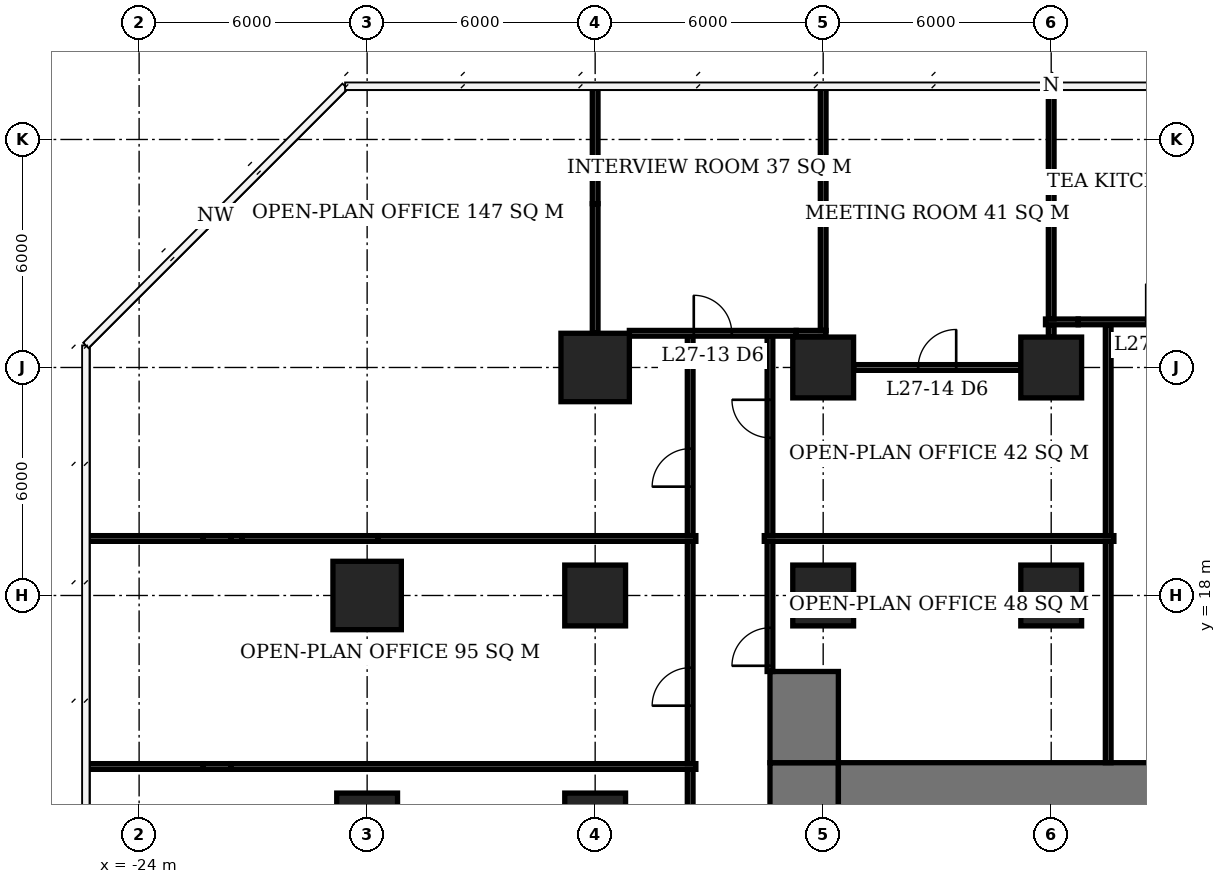
"""IFC4 building model, lengths in metres.
Left out: names, types, materials, properties, quantities, classifications, styles, units other than length and angle.
Written with IfcOpenShell. Run it as: python <this file> out.ifc"""

import sys

from ifc_helpers import new_model, si_unit, direction, frame, frame_2d, origin, origin_2d, place, context, subcontext, project, spatial, rectangle, extrude, element, fill, save


model = new_model("IFC4")
c1 = context("Model", 3, precision=1e-05, world=origin(), true_north=direction((0.0, 1.0)))
c2 = subcontext(c1, "Body", "Model", "MODEL_VIEW")
j1 = project(units=[si_unit("LENGTHUNIT", "METRE"), si_unit("PLANEANGLEUNIT", "RADIAN")], contexts=[c1])
p1 = place(None, origin())
s1 = spatial("IfcSite", under=j1, at=p1, CompositionType="ELEMENT")
p2 = place(p1, origin())
s2 = spatial("IfcBuilding", under=s1, at=p2, CompositionType="ELEMENT")
p3 = place(p2, frame((0.0, 0.0, 113.3)))
s3 = spatial("IfcBuildingStorey", under=s2, at=p3, CompositionType="ELEMENT", Elevation=113.3)
p4 = place(p3, frame((-18.0, 12.0, 0.0), z_axis=(0.0, 0.0, 1.0), x_axis=(1.0, 0.0, 0.0)))
e1 = element("IfcColumn", 1, at=p4, inside=s3, PredefinedType="COLUMN", context=c2, shape_type="SweptSolid", body=[
    extrude(rectangle(XDim=1.6, YDim=1.6, at=origin_2d()), origin(), (0.0, 0.0, 1.0), 3.9),
])
p5 = place(p3, frame((-18.0, 18.0, 0.0), z_axis=(0.0, 0.0, 1.0), x_axis=(1.0, 0.0, 0.0)))
e2 = element("IfcColumn", 2, at=p5, inside=s3, PredefinedType="COLUMN", context=c2, shape_type="SweptSolid", body=[
    extrude(rectangle(XDim=1.8, YDim=1.8, at=origin_2d()), origin(), (0.0, 0.0, 1.0), 3.9),
])
for number, where, z_axis, x_axis in (
    (3, (-12.0, 12.0, 0.0), (0.0, 0.0, 1.0), (1.0, 0.0, 0.0)),
    (4, (-12.0, 18.0, 0.0), (0.0, 0.0, 1.0), (1.0, 0.0, 0.0)),
):
    element("IfcColumn", number, at=place(p3, frame(where, z_axis=z_axis, x_axis=x_axis)), inside=s3, PredefinedType="COLUMN", context=c2, shape_type="SweptSolid", body=[
        extrude(rectangle(XDim=1.6, YDim=1.6, at=origin_2d()), origin(), (0.0, 0.0, 1.0), 3.9),
    ])
p6 = place(p3, frame((-12.0, 24.0, 0.0), z_axis=(0.0, 0.0, 1.0), x_axis=(1.0, 0.0, 0.0)))
e5 = element("IfcColumn", 5, at=p6, inside=s3, PredefinedType="COLUMN", context=c2, shape_type="SweptSolid", body=[
    extrude(rectangle(XDim=1.8, YDim=1.8, at=origin_2d()), origin(), (0.0, 0.0, 1.0), 3.9),
])
for number, where, z_axis, x_axis in (
    (6, (-6.0, 18.0, 0.0), (0.0, 0.0, 1.0), (1.0, 0.0, 0.0)),
    (7, (-6.0, 24.0, 0.0), (0.0, 0.0, 1.0), (1.0, 0.0, 0.0)),
    (8, (0.0, 18.0, 0.0), (0.0, 0.0, 1.0), (1.0, 0.0, 0.0)),
    (9, (0.0, 24.0, 0.0), (0.0, 0.0, 1.0), (1.0, 0.0, 0.0)),
):
    element("IfcColumn", number, at=place(p3, frame(where, z_axis=z_axis, x_axis=x_axis)), inside=s3, PredefinedType="COLUMN", context=c2, shape_type="SweptSolid", body=[
        extrude(rectangle(XDim=1.6, YDim=1.6, at=origin_2d()), origin(), (0.0, 0.0, 1.0), 3.9),
    ])
p7 = place(p3, frame((-5.6, 12.6, 0.0), z_axis=(0.0, 0.0, 1.0), x_axis=(1.0, 0.0, 0.0)))
e10 = element("IfcWall", 10, at=p7, inside=s3, PredefinedType="SHEAR", context=c2, shape_type="SweptSolid", body=[
    extrude(rectangle(XDim=23.2, YDim=2.0, at=frame_2d((11.6, 0.0))), origin(), (0.0, 0.0, 1.0), 3.9),
])
p8 = place(p3, frame((-6.5, -7.6, 0.0), z_axis=(0.0, 0.0, 1.0), x_axis=(0.0, 1.0, 0.0)))
e11 = element("IfcWall", 11, at=p8, inside=s3, PredefinedType="SHEAR", context=c2, shape_type="SweptSolid", body=[
    extrude(rectangle(XDim=21.2, YDim=1.8, at=frame_2d((10.6, 0.0))), origin(), (0.0, 0.0, 1.0), 3.9),
])
p9 = place(p8, frame((7.8, 0.0, 0.0)))
e12 = element("IfcOpeningElement", 12, at=p9, cuts=e11, PredefinedType="OPENING", context=c2, shape_type="SweptSolid", body=[
    extrude(rectangle(XDim=1.8, YDim=2.4, at=frame_2d((0.9, 1.2))), frame((0.0, 0.91, 0.0), z_axis=(0.0, -1.0, 0.0), x_axis=(1.0, 0.0, 0.0)), (0.0, 0.0, 1.0), 1.82),
])
p10 = place(p3, frame((-6.5, 13.6, 0.0), z_axis=(0.0, 0.0, 1.0), x_axis=(0.0, 1.0, 0.0)))
e13 = element("IfcWall", 13, at=p10, inside=s3, PredefinedType="SHEAR", context=c2, shape_type="SweptSolid", body=[
    extrude(rectangle(XDim=2.4, YDim=1.8, at=frame_2d((1.2, 0.0))), origin(), (0.0, 0.0, 1.0), 3.9),
])
p11 = place(p3, frame((-5.2, 24.0, 0.0), z_axis=(0.0, 0.0, 1.0), x_axis=(1.0, 0.0, 0.0)))
e14 = element("IfcWall", 14, at=p11, inside=s3, PredefinedType="PARTITIONING", context=c2, shape_type="SweptSolid", body=[
    extrude(rectangle(XDim=4.4, YDim=0.15, at=frame_2d((2.2, 0.0))), origin(), (0.0, 0.0, 1.0), 3.65),
])
p12 = place(p11, frame((1.7, 0.0, 0.0)))
e15 = element("IfcOpeningElement", 15, at=p12, cuts=e14, PredefinedType="OPENING", context=c2, shape_type="SweptSolid", body=[
    extrude(rectangle(XDim=1.0, YDim=2.1, at=frame_2d((0.5, 1.05))), frame((0.0, 0.085, 0.0), z_axis=(0.0, -1.0, 0.0), x_axis=(1.0, 0.0, 0.0)), (0.0, 0.0, 1.0), 0.17),
])
p13 = place(p3, frame((-11.1, 24.9, 0.0), z_axis=(0.0, 0.0, 1.0), x_axis=(1.0, 0.0, 0.0)))
e16 = element("IfcWall", 16, at=p13, inside=s3, PredefinedType="PARTITIONING", context=c2, shape_type="SweptSolid", body=[
    extrude(rectangle(XDim=4.39, YDim=0.15, at=frame_2d((2.195, 0.0))), origin(), (0.0, 0.0, 1.0), 3.65),
])
p14 = place(p13, frame((1.695, 0.0, 0.0)))
e17 = element("IfcOpeningElement", 17, at=p14, cuts=e16, PredefinedType="OPENING", context=c2, shape_type="SweptSolid", body=[
    extrude(rectangle(XDim=1.0, YDim=2.1, at=frame_2d((0.5, 1.05))), frame((0.0, 0.085, 0.0), z_axis=(0.0, -1.0, 0.0), x_axis=(1.0, 0.0, 0.0)), (0.0, 0.0, 1.0), 0.17),
])
p15 = place(p3, frame((-6.71, 24.9, 0.0), z_axis=(0.0, 0.0, 1.0), x_axis=(1.0, 0.0, 0.0)))
e18 = element("IfcWall", 18, at=p15, inside=s3, PredefinedType="PARTITIONING", context=c2, shape_type="SweptSolid", body=[
    extrude(rectangle(XDim=0.785, YDim=0.15, at=frame_2d((0.393, 0.0))), origin(), (0.0, 0.0, 1.0), 2.65),
])
p16 = place(p3, frame((-0.15, 25.2, 0.0), z_axis=(0.0, 0.0, 1.0), x_axis=(1.0, 0.0, 0.0)))
e19 = element("IfcWall", 19, at=p16, inside=s3, PredefinedType="PARTITIONING", context=c2, shape_type="SweptSolid", body=[
    extrude(rectangle(XDim=0.86, YDim=0.15, at=frame_2d((0.43, 0.0))), origin(), (0.0, 0.0, 1.0), 2.65),
])
p17 = place(p3, frame((0.71, 25.2, 0.0), z_axis=(0.0, 0.0, 1.0), x_axis=(1.0, 0.0, 0.0)))
e20 = element("IfcWall", 20, at=p17, inside=s3, PredefinedType="PARTITIONING", context=c2, shape_type="SweptSolid", body=[
    extrude(rectangle(XDim=4.58, YDim=0.15, at=frame_2d((2.29, 0.0))), origin(), (0.0, 0.0, 1.0), 3.65),
])
p18 = place(p17, frame((1.79, 0.0, 0.0)))
e21 = element("IfcOpeningElement", 21, at=p18, cuts=e20, PredefinedType="OPENING", context=c2, shape_type="SweptSolid", body=[
    extrude(rectangle(XDim=1.0, YDim=2.1, at=frame_2d((0.5, 1.05))), frame((0.0, 0.085, 0.0), z_axis=(0.0, -1.0, 0.0), x_axis=(1.0, 0.0, 0.0)), (0.0, 0.0, 1.0), 0.17),
])
p19 = place(p3, frame((-12.0, 24.9, 0.0), z_axis=(0.0, 0.0, 1.0), x_axis=(0.0, 1.0, 0.0)))
e22 = element("IfcWall", 22, at=p19, inside=s3, PredefinedType="PARTITIONING", context=c2, shape_type="SweptSolid", body=[
    extrude(rectangle(XDim=3.41, YDim=0.15, at=frame_2d((1.705, 0.0))), origin(), (0.0, 0.0, 1.0), 2.65),
])
p20 = place(p3, frame((-12.0, 28.31, 0.0), z_axis=(0.0, 0.0, 1.0), x_axis=(0.0, 1.0, 0.0)))
e23 = element("IfcWall", 23, at=p20, inside=s3, PredefinedType="PARTITIONING", context=c2, shape_type="SweptSolid", body=[
    extrude(rectangle(XDim=3.09, YDim=0.15, at=frame_2d((1.545, 0.0))), origin(), (0.0, 0.0, 1.0), 3.65),
])
p21 = place(p3, frame((-6.0, 24.975, 0.0), z_axis=(0.0, 0.0, 1.0), x_axis=(0.0, 1.0, 0.0)))
e24 = element("IfcWall", 24, at=p21, inside=s3, PredefinedType="PARTITIONING", context=c2, shape_type="SweptSolid", body=[
    extrude(rectangle(XDim=3.335, YDim=0.15, at=frame_2d((1.667, 0.0))), origin(), (0.0, 0.0, 1.0), 2.65),
])
p22 = place(p3, frame((-6.0, 28.31, 0.0), z_axis=(0.0, 0.0, 1.0), x_axis=(0.0, 1.0, 0.0)))
e25 = element("IfcWall", 25, at=p22, inside=s3, PredefinedType="PARTITIONING", context=c2, shape_type="SweptSolid", body=[
    extrude(rectangle(XDim=3.09, YDim=0.15, at=frame_2d((1.545, 0.0))), origin(), (0.0, 0.0, 1.0), 3.65),
])
p23 = place(p3, frame((0.0, 24.8, 0.0), z_axis=(0.0, 0.0, 1.0), x_axis=(0.0, 1.0, 0.0)))
e26 = element("IfcWall", 26, at=p23, inside=s3, PredefinedType="PARTITIONING", context=c2, shape_type="SweptSolid", body=[
    extrude(rectangle(XDim=0.325, YDim=0.15, at=frame_2d((0.163, 0.0))), origin(), (0.0, 0.0, 1.0), 2.65),
])
p24 = place(p3, frame((0.0, 25.275, 0.0), z_axis=(0.0, 0.0, 1.0), x_axis=(0.0, 1.0, 0.0)))
e27 = element("IfcWall", 27, at=p24, inside=s3, PredefinedType="PARTITIONING", context=c2, shape_type="SweptSolid", body=[
    extrude(rectangle(XDim=3.035, YDim=0.15, at=frame_2d((1.518, 0.0))), origin(), (0.0, 0.0, 1.0), 2.65),
])
p25 = place(p3, frame((0.0, 28.31, 0.0), z_axis=(0.0, 0.0, 1.0), x_axis=(0.0, 1.0, 0.0)))
e28 = element("IfcWall", 28, at=p25, inside=s3, PredefinedType="PARTITIONING", context=c2, shape_type="SweptSolid", body=[
    extrude(rectangle(XDim=3.04, YDim=0.15, at=frame_2d((1.52, 0.0))), origin(), (0.0, 0.0, 1.0), 3.65),
])
p26 = place(p3, frame((-25.4, 13.5, 0.0), z_axis=(0.0, 0.0, 1.0), x_axis=(1.0, 0.0, 0.0)))
e29 = element("IfcWall", 29, at=p26, inside=s3, PredefinedType="PARTITIONING", context=c2, shape_type="SweptSolid", body=[
    extrude(rectangle(XDim=3.09, YDim=0.15, at=frame_2d((1.545, 0.0))), origin(), (0.0, 0.0, 1.0), 3.65),
])
p27 = place(p3, frame((-22.31, 13.5, 0.0), z_axis=(0.0, 0.0, 1.0), x_axis=(1.0, 0.0, 0.0)))
e30 = element("IfcWall", 30, at=p27, inside=s3, PredefinedType="PARTITIONING", context=c2, shape_type="SweptSolid", body=[
    extrude(rectangle(XDim=0.72, YDim=0.15, at=frame_2d((0.36, 0.0))), origin(), (0.0, 0.0, 1.0), 2.65),
])
p28 = place(p3, frame((-21.59, 13.5, 0.0), z_axis=(0.0, 0.0, 1.0), x_axis=(1.0, 0.0, 0.0)))
e31 = element("IfcWall", 31, at=p28, inside=s3, PredefinedType="PARTITIONING", context=c2, shape_type="SweptSolid", body=[
    extrude(rectangle(XDim=12.24, YDim=0.15, at=frame_2d((6.12, 0.0))), origin(), (0.0, 0.0, 1.0), 3.65),
])
p29 = place(p3, frame((-25.4, 19.5, 0.0), z_axis=(0.0, 0.0, 1.0), x_axis=(1.0, 0.0, 0.0)))
e32 = element("IfcWall", 32, at=p29, inside=s3, PredefinedType="PARTITIONING", context=c2, shape_type="SweptSolid", body=[
    extrude(rectangle(XDim=3.09, YDim=0.15, at=frame_2d((1.545, 0.0))), origin(), (0.0, 0.0, 1.0), 3.65),
])
p30 = place(p3, frame((-22.31, 19.5, 0.0), z_axis=(0.0, 0.0, 1.0), x_axis=(1.0, 0.0, 0.0)))
e33 = element("IfcWall", 33, at=p30, inside=s3, PredefinedType="PARTITIONING", context=c2, shape_type="SweptSolid", body=[
    extrude(rectangle(XDim=0.72, YDim=0.15, at=frame_2d((0.36, 0.0))), origin(), (0.0, 0.0, 1.0), 2.65),
])
p31 = place(p3, frame((-21.59, 19.5, 0.0), z_axis=(0.0, 0.0, 1.0), x_axis=(1.0, 0.0, 0.0)))
e34 = element("IfcWall", 34, at=p31, inside=s3, PredefinedType="PARTITIONING", context=c2, shape_type="SweptSolid", body=[
    extrude(rectangle(XDim=0.298, YDim=0.15, at=frame_2d((0.149, 0.0))), origin(), (0.0, 0.0, 1.0), 3.65),
])
p32 = place(p3, frame((-21.292, 19.5, 0.0), z_axis=(0.0, 0.0, 1.0), x_axis=(1.0, 0.0, 0.0)))
e35 = element("IfcWall", 35, at=p32, inside=s3, PredefinedType="PARTITIONING", context=c2, shape_type="SweptSolid", body=[
    extrude(rectangle(XDim=3.584, YDim=0.15, at=frame_2d((1.792, 0.0))), origin(), (0.0, 0.0, 1.0), 2.65),
])
p33 = place(p3, frame((-17.708, 19.5, 0.0), z_axis=(0.0, 0.0, 1.0), x_axis=(1.0, 0.0, 0.0)))
e36 = element("IfcWall", 36, at=p33, inside=s3, PredefinedType="PARTITIONING", context=c2, shape_type="SweptSolid", body=[
    extrude(rectangle(XDim=8.358, YDim=0.15, at=frame_2d((4.179, 0.0))), origin(), (0.0, 0.0, 1.0), 3.65),
])
p34 = place(p3, frame((-9.5, 7.575, 0.0), z_axis=(0.0, 0.0, 1.0), x_axis=(0.0, 1.0, 0.0)))
e37 = element("IfcWall", 37, at=p34, inside=s3, PredefinedType="PARTITIONING", context=c2, shape_type="SweptSolid", body=[
    extrude(rectangle(XDim=5.85, YDim=0.15, at=frame_2d((2.925, 0.0))), origin(), (0.0, 0.0, 1.0), 3.65),
])
p35 = place(p34, frame((1.525, 0.0, 0.0)))
e38 = element("IfcOpeningElement", 38, at=p35, cuts=e37, PredefinedType="OPENING", context=c2, shape_type="SweptSolid", body=[
    extrude(rectangle(XDim=1.0, YDim=2.1, at=frame_2d((0.5, 1.05))), frame((0.0, 0.085, 0.0), z_axis=(0.0, -1.0, 0.0), x_axis=(1.0, 0.0, 0.0)), (0.0, 0.0, 1.0), 0.17),
])
p36 = place(p3, frame((-9.5, 13.575, 0.0), z_axis=(0.0, 0.0, 1.0), x_axis=(0.0, 1.0, 0.0)))
e39 = element("IfcWall", 39, at=p36, inside=s3, PredefinedType="PARTITIONING", context=c2, shape_type="SweptSolid", body=[
    extrude(rectangle(XDim=5.85, YDim=0.15, at=frame_2d((2.925, 0.0))), origin(), (0.0, 0.0, 1.0), 3.65),
])
p37 = place(p36, frame((1.525, 0.0, 0.0)))
e40 = element("IfcOpeningElement", 40, at=p37, cuts=e39, PredefinedType="OPENING", context=c2, shape_type="SweptSolid", body=[
    extrude(rectangle(XDim=1.0, YDim=2.1, at=frame_2d((0.5, 1.05))), frame((0.0, 0.085, 0.0), z_axis=(0.0, -1.0, 0.0), x_axis=(1.0, 0.0, 0.0)), (0.0, 0.0, 1.0), 0.17),
])
p38 = place(p3, frame((-9.5, 19.575, 0.0), z_axis=(0.0, 0.0, 1.0), x_axis=(0.0, 1.0, 0.0)))
e41 = element("IfcWall", 41, at=p38, inside=s3, PredefinedType="PARTITIONING", context=c2, shape_type="SweptSolid", body=[
    extrude(rectangle(XDim=5.25, YDim=0.15, at=frame_2d((2.625, 0.0))), origin(), (0.0, 0.0, 1.0), 3.65),
])
p39 = place(p38, frame((1.289, 0.0, 0.0)))
e42 = element("IfcOpeningElement", 42, at=p39, cuts=e41, PredefinedType="OPENING", context=c2, shape_type="SweptSolid", body=[
    extrude(rectangle(XDim=1.0, YDim=2.1, at=frame_2d((0.5, 1.05))), frame((0.0, 0.085, 0.0), z_axis=(0.0, -1.0, 0.0), x_axis=(1.0, 0.0, 0.0)), (0.0, 0.0, 1.0), 0.17),
])
p40 = place(p3, frame((-7.4, 16.0, 0.0), z_axis=(0.0, 0.0, 1.0), x_axis=(0.0, 1.0, 0.0)))
e43 = element("IfcWall", 43, at=p40, inside=s3, PredefinedType="PARTITIONING", context=c2, shape_type="SweptSolid", body=[
    extrude(rectangle(XDim=3.425, YDim=0.15, at=frame_2d((1.712, 0.0))), origin(), (0.0, 0.0, 1.0), 3.65),
])
p41 = place(p40, frame((0.15, 0.0, 0.0)))
e44 = element("IfcOpeningElement", 44, at=p41, cuts=e43, PredefinedType="OPENING", context=c2, shape_type="SweptSolid", body=[
    extrude(rectangle(XDim=1.0, YDim=2.1, at=frame_2d((0.5, 1.05))), frame((0.0, 0.085, 0.0), z_axis=(0.0, -1.0, 0.0), x_axis=(1.0, 0.0, 0.0)), (0.0, 0.0, 1.0), 0.17),
])
p42 = place(p3, frame((-7.4, 19.575, 0.0), z_axis=(0.0, 0.0, 1.0), x_axis=(0.0, 1.0, 0.0)))
e45 = element("IfcWall", 45, at=p42, inside=s3, PredefinedType="PARTITIONING", context=c2, shape_type="SweptSolid", body=[
    extrude(rectangle(XDim=5.25, YDim=0.15, at=frame_2d((2.625, 0.0))), origin(), (0.0, 0.0, 1.0), 3.65),
])
p43 = place(p42, frame((2.575, 0.0, 0.0)))
e46 = element("IfcOpeningElement", 46, at=p43, cuts=e45, PredefinedType="OPENING", context=c2, shape_type="SweptSolid", body=[
    extrude(rectangle(XDim=1.0, YDim=2.1, at=frame_2d((0.5, 1.05))), frame((0.0, 0.085, 0.0), z_axis=(0.0, -1.0, 0.0), x_axis=(1.0, 0.0, 0.0)), (0.0, 0.0, 1.0), 0.17),
])
p44 = place(p3, frame((-7.55, 19.5, 0.0), z_axis=(0.0, 0.0, 1.0), x_axis=(1.0, 0.0, 0.0)))
e47 = element("IfcWall", 47, at=p44, inside=s3, PredefinedType="PARTITIONING", context=c2, shape_type="SweptSolid", body=[
    extrude(rectangle(XDim=9.2, YDim=0.15, at=frame_2d((4.6, 0.0))), origin(), (0.0, 0.0, 1.0), 3.65),
])
p45 = place(p3, frame((1.5, 13.6, 0.0), z_axis=(0.0, 0.0, 1.0), x_axis=(0.0, 1.0, 0.0)))
e48 = element("IfcWall", 48, at=p45, inside=s3, PredefinedType="PARTITIONING", context=c2, shape_type="SweptSolid", body=[
    extrude(rectangle(XDim=5.825, YDim=0.15, at=frame_2d((2.913, 0.0))), origin(), (0.0, 0.0, 1.0), 3.65),
])
p46 = place(p3, frame((1.5, 19.575, 0.0), z_axis=(0.0, 0.0, 1.0), x_axis=(0.0, 1.0, 0.0)))
e49 = element("IfcWall", 49, at=p46, inside=s3, PredefinedType="PARTITIONING", context=c2, shape_type="SweptSolid", body=[
    extrude(rectangle(XDim=5.55, YDim=0.15, at=frame_2d((2.775, 0.0))), origin(), (0.0, 0.0, 1.0), 3.65),
])
p47 = place(p14, origin())
e50 = element("IfcDoor", 50, at=p47, inside=s3, OperationType="SINGLE_SWING_LEFT", PredefinedType="DOOR", context=c2, shape_type="SweptSolid", body=[
    extrude(rectangle(XDim=1.0, YDim=2.1, at=frame_2d((0.5, 1.05))), frame((0.0, 0.025, 0.0), z_axis=(0.0, -1.0, 0.0), x_axis=(1.0, 0.0, 0.0)), (0.0, 0.0, 1.0), 0.05),
])
fill(e17, e50)
p48 = place(p12, origin())
e51 = element("IfcDoor", 51, at=p48, inside=s3, OperationType="SINGLE_SWING_RIGHT", PredefinedType="DOOR", context=c2, shape_type="SweptSolid", body=[
    extrude(rectangle(XDim=1.0, YDim=2.1, at=frame_2d((0.5, 1.05))), frame((0.0, 0.025, 0.0), z_axis=(0.0, -1.0, 0.0), x_axis=(1.0, 0.0, 0.0)), (0.0, 0.0, 1.0), 0.05),
])
fill(e15, e51)
p49 = place(p37, origin())
e52 = element("IfcDoor", 52, at=p49, inside=s3, OperationType="SINGLE_SWING_LEFT", PredefinedType="DOOR", context=c2, shape_type="SweptSolid", body=[
    extrude(rectangle(XDim=1.0, YDim=2.1, at=frame_2d((0.5, 1.05))), frame((0.0, 0.025, 0.0), z_axis=(0.0, -1.0, 0.0), x_axis=(1.0, 0.0, 0.0)), (0.0, 0.0, 1.0), 0.05),
])
fill(e40, e52)
p50 = place(p39, origin())
e53 = element("IfcDoor", 53, at=p50, inside=s3, OperationType="SINGLE_SWING_LEFT", PredefinedType="DOOR", context=c2, shape_type="SweptSolid", body=[
    extrude(rectangle(XDim=1.0, YDim=2.1, at=frame_2d((0.5, 1.05))), frame((0.0, 0.025, 0.0), z_axis=(0.0, -1.0, 0.0), x_axis=(1.0, 0.0, 0.0)), (0.0, 0.0, 1.0), 0.05),
])
fill(e42, e53)
p51 = place(p41, origin())
e54 = element("IfcDoor", 54, at=p51, inside=s3, OperationType="SINGLE_SWING_LEFT", PredefinedType="DOOR", context=c2, shape_type="SweptSolid", body=[
    extrude(rectangle(XDim=1.0, YDim=2.1, at=frame_2d((0.5, 1.05))), frame((0.0, 0.025, 0.0), z_axis=(0.0, -1.0, 0.0), x_axis=(1.0, 0.0, 0.0)), (0.0, 0.0, 1.0), 0.05),
])
fill(e44, e54)
p52 = place(p43, origin())
e55 = element("IfcDoor", 55, at=p52, inside=s3, OperationType="SINGLE_SWING_RIGHT", PredefinedType="DOOR", context=c2, shape_type="SweptSolid", body=[
    extrude(rectangle(XDim=1.0, YDim=2.1, at=frame_2d((0.5, 1.05))), frame((0.0, 0.025, 0.0), z_axis=(0.0, -1.0, 0.0), x_axis=(1.0, 0.0, 0.0)), (0.0, 0.0, 1.0), 0.05),
])
fill(e46, e55)
save(model, sys.argv[1])
